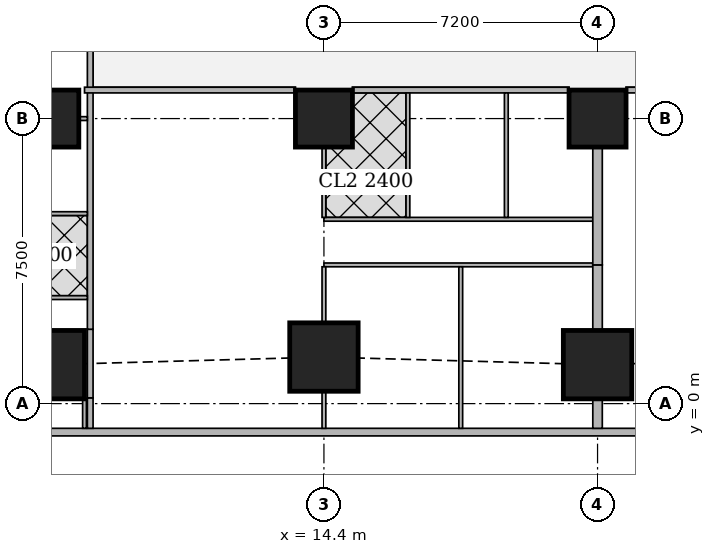
"""IFC4 building model, lengths in metres.
Left out: names, types, materials, properties, quantities, classifications, styles, units other than length and angle.
Written with IfcOpenShell. Run it as: python <this file> out.ifc"""

import sys

from ifc_helpers import new_model, si_unit, direction, frame, frame_2d, origin, origin_2d, place, context, subcontext, project, spatial, rectangle, extrude, element, fill, save


model = new_model("IFC4")
c1 = context("Model", 3, precision=1e-05, world=origin(), true_north=direction((0.0, 1.0)))
c2 = subcontext(c1, "Body", "Model", "MODEL_VIEW")
j1 = project(units=[si_unit("LENGTHUNIT", "METRE"), si_unit("PLANEANGLEUNIT", "RADIAN")], contexts=[c1])
p1 = place(None, origin())
s1 = spatial("IfcSite", under=j1, at=p1, CompositionType="ELEMENT")
p2 = place(p1, origin())
s2 = spatial("IfcBuilding", under=s1, at=p2, CompositionType="ELEMENT")
p3 = place(p2, frame((0.0, 0.0, 169.55)))
s3 = spatial("IfcBuildingStorey", under=s2, at=p3, CompositionType="ELEMENT", Elevation=169.55)
for number, where, z_axis, x_axis in (
    (1, (7.2, 1.025, 0.0), (0.0, 0.0, 1.0), (1.0, 0.0, 0.0)),
    (2, (14.4, 1.225, 0.0), (0.0, 0.0, 1.0), (1.0, 0.0, 0.0)),
    (3, (21.6, 1.025, 0.0), (0.0, 0.0, 1.0), (1.0, 0.0, 0.0)),
):
    element("IfcColumn", number, at=place(p3, frame(where, z_axis=z_axis, x_axis=x_axis)), inside=s3, PredefinedType="COLUMN", context=c2, shape_type="SweptSolid", body=[
        extrude(rectangle(XDim=1.8, YDim=1.8, at=origin_2d()), origin(), (0.0, 0.0, 1.0), 3.75),
    ])
for number, where, z_axis, x_axis in (
    (4, (7.2, 7.5, 0.0), (0.0, 0.0, 1.0), (1.0, 0.0, 0.0)),
    (5, (14.4, 7.5, 0.0), (0.0, 0.0, 1.0), (1.0, 0.0, 0.0)),
    (6, (21.6, 7.5, 0.0), (0.0, 0.0, 1.0), (1.0, 0.0, 0.0)),
):
    element("IfcColumn", number, at=place(p3, frame(where, z_axis=z_axis, x_axis=x_axis)), inside=s3, PredefinedType="COLUMN", context=c2, shape_type="SweptSolid", body=[
        extrude(rectangle(XDim=1.5, YDim=1.5, at=origin_2d()), origin(), (0.0, 0.0, 1.0), 3.75),
    ])
p4 = place(p3, frame((2.163, -0.75, 0.0), z_axis=(0.0, 0.0, 1.0), x_axis=(1.0, 0.0, 0.0)))
e7 = element("IfcWall", 7, at=p4, inside=s3, PredefinedType="SOLIDWALL", context=c2, shape_type="SweptSolid", body=[
    extrude(rectangle(XDim=45.628, YDim=0.2, at=frame_2d((22.814, 0.0))), origin(), (0.0, 0.0, 1.0), 3.5),
])
p5 = place(p4, frame((9.537, 0.0, 0.9)))
e8 = element("IfcOpeningElement", 8, at=p5, cuts=e7, PredefinedType="OPENING", context=c2, shape_type="SweptSolid", body=[
    extrude(rectangle(XDim=1.8, YDim=1.5, at=frame_2d((0.9, 0.75))), frame((0.0, 0.11, 0.0), z_axis=(0.0, -1.0, 0.0), x_axis=(1.0, 0.0, 0.0)), (0.0, 0.0, 1.0), 0.22),
])
p6 = place(p4, frame((13.137, 0.0, 0.9)))
e9 = element("IfcOpeningElement", 9, at=p6, cuts=e7, PredefinedType="OPENING", context=c2, shape_type="SweptSolid", body=[
    extrude(rectangle(XDim=1.8, YDim=1.5, at=frame_2d((0.9, 0.75))), frame((0.0, 0.11, 0.0), z_axis=(0.0, -1.0, 0.0), x_axis=(1.0, 0.0, 0.0)), (0.0, 0.0, 1.0), 0.22),
])
p7 = place(p4, frame((16.737, 0.0, 0.9)))
e10 = element("IfcOpeningElement", 10, at=p7, cuts=e7, PredefinedType="OPENING", context=c2, shape_type="SweptSolid", body=[
    extrude(rectangle(XDim=1.8, YDim=1.5, at=frame_2d((0.9, 0.75))), frame((0.0, 0.11, 0.0), z_axis=(0.0, -1.0, 0.0), x_axis=(1.0, 0.0, 0.0)), (0.0, 0.0, 1.0), 0.22),
])
p8 = place(p4, frame((20.337, 0.0, 0.9)))
e11 = element("IfcOpeningElement", 11, at=p8, cuts=e7, PredefinedType="OPENING", context=c2, shape_type="SweptSolid", body=[
    extrude(rectangle(XDim=1.8, YDim=1.5, at=frame_2d((0.9, 0.75))), frame((0.0, 0.11, 0.0), z_axis=(0.0, -1.0, 0.0), x_axis=(1.0, 0.0, 0.0)), (0.0, 0.0, 1.0), 0.22),
])
p9 = place(p4, frame((23.937, 0.0, 0.9)))
e12 = element("IfcOpeningElement", 12, at=p9, cuts=e7, PredefinedType="OPENING", context=c2, shape_type="SweptSolid", body=[
    extrude(rectangle(XDim=1.8, YDim=1.5, at=frame_2d((0.9, 0.75))), frame((0.0, 0.11, 0.0), z_axis=(0.0, -1.0, 0.0), x_axis=(1.0, 0.0, 0.0)), (0.0, 0.0, 1.0), 0.22),
])
p10 = place(p4, frame((27.537, 0.0, 0.9)))
e13 = element("IfcOpeningElement", 13, at=p10, cuts=e7, PredefinedType="OPENING", context=c2, shape_type="SweptSolid", body=[
    extrude(rectangle(XDim=1.8, YDim=1.5, at=frame_2d((0.9, 0.75))), frame((0.0, 0.11, 0.0), z_axis=(0.0, -1.0, 0.0), x_axis=(1.0, 0.0, 0.0)), (0.0, 0.0, 1.0), 0.22),
])
p11 = place(p4, frame((31.137, 0.0, 0.9)))
e14 = element("IfcOpeningElement", 14, at=p11, cuts=e7, PredefinedType="OPENING", context=c2, shape_type="SweptSolid", body=[
    extrude(rectangle(XDim=1.8, YDim=1.5, at=frame_2d((0.9, 0.75))), frame((0.0, 0.11, 0.0), z_axis=(0.0, -1.0, 0.0), x_axis=(1.0, 0.0, 0.0)), (0.0, 0.0, 1.0), 0.22),
])
p12 = place(p4, frame((34.737, 0.0, 0.9)))
e15 = element("IfcOpeningElement", 15, at=p12, cuts=e7, PredefinedType="OPENING", context=c2, shape_type="SweptSolid", body=[
    extrude(rectangle(XDim=1.8, YDim=1.5, at=frame_2d((0.9, 0.75))), frame((0.0, 0.11, 0.0), z_axis=(0.0, -1.0, 0.0), x_axis=(1.0, 0.0, 0.0)), (0.0, 0.0, 1.0), 0.22),
])
p13 = place(p3, frame((8.25, -0.65, 0.0), z_axis=(0.0, 0.0, 1.0), x_axis=(0.0, 1.0, 0.0)))
e16 = element("IfcWall", 16, at=p13, inside=s3, PredefinedType="SOLIDWALL", context=c2, shape_type="SweptSolid", body=[
    extrude(rectangle(XDim=0.802, YDim=0.15, at=frame_2d((0.401, 0.0))), origin(), (0.0, 0.0, 1.0), 3.5),
])
p14 = place(p3, frame((8.25, 0.152, 0.0), z_axis=(0.0, 0.0, 1.0), x_axis=(0.0, 1.0, 0.0)))
e17 = element("IfcWall", 17, at=p14, inside=s3, PredefinedType="SOLIDWALL", context=c2, shape_type="SweptSolid", body=[
    extrude(rectangle(XDim=1.805, YDim=0.15, at=frame_2d((0.902, 0.0))), origin(), (0.0, 0.0, 1.0), 2.1),
])
p15 = place(p3, frame((8.25, 1.957, 0.0), z_axis=(0.0, 0.0, 1.0), x_axis=(0.0, 1.0, 0.0)))
e18 = element("IfcWall", 18, at=p15, inside=s3, PredefinedType="SOLIDWALL", context=c2, shape_type="SweptSolid", body=[
    extrude(rectangle(XDim=41.111, YDim=0.15, at=frame_2d((20.556, 0.0))), origin(), (0.0, 0.0, 1.0), 3.5),
])
p16 = place(p15, frame((10.642, 0.0, 0.0)))
e19 = element("IfcOpeningElement", 19, at=p16, cuts=e18, PredefinedType="OPENING", context=c2, shape_type="SweptSolid", body=[
    extrude(rectangle(XDim=1.0, YDim=2.1, at=frame_2d((0.5, 1.05))), frame((0.0, 0.085, 0.0), z_axis=(0.0, -1.0, 0.0), x_axis=(1.0, 0.0, 0.0)), (0.0, 0.0, 1.0), 0.17),
])
p17 = place(p15, frame((15.042, 0.0, 0.0)))
e20 = element("IfcOpeningElement", 20, at=p17, cuts=e18, PredefinedType="OPENING", context=c2, shape_type="SweptSolid", body=[
    extrude(rectangle(XDim=1.0, YDim=2.1, at=frame_2d((0.5, 1.05))), frame((0.0, 0.085, 0.0), z_axis=(0.0, -1.0, 0.0), x_axis=(1.0, 0.0, 0.0)), (0.0, 0.0, 1.0), 0.17),
])
p18 = place(p15, frame((22.543, 0.0, 0.0)))
e21 = element("IfcOpeningElement", 21, at=p18, cuts=e18, PredefinedType="OPENING", context=c2, shape_type="SweptSolid", body=[
    extrude(rectangle(XDim=1.0, YDim=2.1, at=frame_2d((0.5, 1.05))), frame((0.0, 0.085, 0.0), z_axis=(0.0, -1.0, 0.0), x_axis=(1.0, 0.0, 0.0)), (0.0, 0.0, 1.0), 0.17),
])
p19 = place(p15, frame((33.142, 0.0, 0.0)))
e22 = element("IfcOpeningElement", 22, at=p19, cuts=e18, PredefinedType="OPENING", context=c2, shape_type="SweptSolid", body=[
    extrude(rectangle(XDim=1.0, YDim=2.1, at=frame_2d((0.5, 1.05))), frame((0.0, 0.085, 0.0), z_axis=(0.0, -1.0, 0.0), x_axis=(1.0, 0.0, 0.0)), (0.0, 0.0, 1.0), 0.17),
])
p20 = place(p3, frame((28.049, 8.25, 0.0), z_axis=(0.0, 0.0, 1.0), x_axis=(-1.0, 0.0, 0.0)))
e23 = element("IfcWall", 23, at=p20, inside=s3, PredefinedType="SOLIDWALL", context=c2, shape_type="SweptSolid", body=[
    extrude(rectangle(XDim=5.698, YDim=0.15, at=frame_2d((2.849, 0.0))), origin(), (0.0, 0.0, 1.0), 3.5),
])
p21 = place(p20, frame((3.549, 0.0, 0.0)))
e24 = element("IfcOpeningElement", 24, at=p21, cuts=e23, PredefinedType="OPENING", context=c2, shape_type="SweptSolid", body=[
    extrude(rectangle(XDim=1.0, YDim=2.1, at=frame_2d((0.5, 1.05))), frame((0.0, 0.085, 0.0), z_axis=(0.0, -1.0, 0.0), x_axis=(1.0, 0.0, 0.0)), (0.0, 0.0, 1.0), 0.17),
])
p22 = place(p3, frame((20.849, 8.25, 0.0), z_axis=(0.0, 0.0, 1.0), x_axis=(-1.0, 0.0, 0.0)))
e25 = element("IfcWall", 25, at=p22, inside=s3, PredefinedType="SOLIDWALL", context=c2, shape_type="SweptSolid", body=[
    extrude(rectangle(XDim=5.698, YDim=0.15, at=frame_2d((2.849, 0.0))), origin(), (0.0, 0.0, 1.0), 3.5),
])
p23 = place(p3, frame((13.649, 8.25, 0.0), z_axis=(0.0, 0.0, 1.0), x_axis=(-1.0, 0.0, 0.0)))
e26 = element("IfcWall", 26, at=p23, inside=s3, PredefinedType="SOLIDWALL", context=c2, shape_type="SweptSolid", body=[
    extrude(rectangle(XDim=5.549, YDim=0.15, at=frame_2d((2.774, 0.0))), origin(), (0.0, 0.0, 1.0), 3.5),
])
p24 = place(p23, frame((1.824, 0.0, 0.0)))
e27 = element("IfcOpeningElement", 27, at=p24, cuts=e26, PredefinedType="OPENING", context=c2, shape_type="SweptSolid", body=[
    extrude(rectangle(XDim=1.0, YDim=2.1, at=frame_2d((0.5, 1.05))), frame((0.0, 0.085, 0.0), z_axis=(0.0, -1.0, 0.0), x_axis=(1.0, 0.0, 0.0)), (0.0, 0.0, 1.0), 0.17),
])
p25 = place(p3, frame((8.1, 0.124, 0.0), z_axis=(0.0, 0.0, 1.0), x_axis=(0.0, -1.0, 0.0)))
e28 = element("IfcWall", 28, at=p25, inside=s3, PredefinedType="PARTITIONING", context=c2, shape_type="SweptSolid", body=[
    extrude(rectangle(XDim=0.774, YDim=0.1, at=frame_2d((0.387, 0.0))), origin(), (0.0, 0.0, 1.0), 3.5),
])
p26 = place(p3, frame((4.9, 4.999, 0.0), z_axis=(0.0, 0.0, 1.0), x_axis=(1.0, 0.0, 0.0)))
e29 = element("IfcWall", 29, at=p26, inside=s3, PredefinedType="PARTITIONING", context=c2, shape_type="SweptSolid", body=[
    extrude(rectangle(XDim=3.275, YDim=0.1, at=frame_2d((1.638, 0.0))), origin(), (0.0, 0.0, 1.0), 3.5),
])
p27 = place(p3, frame((7.951, 7.5, 0.0), z_axis=(0.0, 0.0, 1.0), x_axis=(1.0, 0.0, 0.0)))
e30 = element("IfcWall", 30, at=p27, inside=s3, PredefinedType="PARTITIONING", context=c2, shape_type="SweptSolid", body=[
    extrude(rectangle(XDim=0.224, YDim=0.1, at=frame_2d((0.112, 0.0))), origin(), (0.0, 0.0, 1.0), 3.5),
])
p28 = place(p3, frame((4.9, 2.789, 0.0), z_axis=(0.0, 0.0, 1.0), x_axis=(1.0, 0.0, 0.0)))
e31 = element("IfcWall", 31, at=p28, inside=s3, PredefinedType="PARTITIONING", context=c2, shape_type="SweptSolid", body=[
    extrude(rectangle(XDim=3.275, YDim=0.1, at=frame_2d((1.638, 0.0))), origin(), (0.0, 0.0, 1.0), 3.5),
])
p29 = place(p28, frame((0.45, 0.0, 0.0)))
e32 = element("IfcOpeningElement", 32, at=p29, cuts=e31, PredefinedType="OPENING", context=c2, shape_type="SweptSolid", body=[
    extrude(rectangle(XDim=0.9, YDim=2.1, at=frame_2d((0.45, 1.05))), frame((0.0, 0.06, 0.0), z_axis=(0.0, -1.0, 0.0), x_axis=(1.0, 0.0, 0.0)), (0.0, 0.0, 1.0), 0.12),
])
p30 = place(p3, frame((21.475, 3.65, 0.0), z_axis=(0.0, 0.0, 1.0), x_axis=(-1.0, 0.0, 0.0)))
e33 = element("IfcWall", 33, at=p30, inside=s3, PredefinedType="PARTITIONING", context=c2, shape_type="SweptSolid", body=[
    extrude(rectangle(XDim=7.075, YDim=0.1, at=frame_2d((3.538, 0.0))), origin(), (0.0, 0.0, 1.0), 3.5),
])
p31 = place(p30, frame((5.975, 0.0, 0.0)))
e34 = element("IfcOpeningElement", 34, at=p31, cuts=e33, PredefinedType="OPENING", context=c2, shape_type="SweptSolid", body=[
    extrude(rectangle(XDim=0.9, YDim=2.1, at=frame_2d((0.45, 1.05))), frame((0.0, 0.06, 0.0), z_axis=(0.0, -1.0, 0.0), x_axis=(1.0, 0.0, 0.0)), (0.0, 0.0, 1.0), 0.12),
])
p32 = place(p30, frame((2.375, 0.0, 0.0)))
e35 = element("IfcOpeningElement", 35, at=p32, cuts=e33, PredefinedType="OPENING", context=c2, shape_type="SweptSolid", body=[
    extrude(rectangle(XDim=0.9, YDim=2.1, at=frame_2d((0.45, 1.05))), frame((0.0, 0.06, 0.0), z_axis=(0.0, -1.0, 0.0), x_axis=(1.0, 0.0, 0.0)), (0.0, 0.0, 1.0), 0.12),
])
p33 = place(p3, frame((21.475, 4.85, 0.0), z_axis=(0.0, 0.0, 1.0), x_axis=(-1.0, 0.0, 0.0)))
e36 = element("IfcWall", 36, at=p33, inside=s3, PredefinedType="PARTITIONING", context=c2, shape_type="SweptSolid", body=[
    extrude(rectangle(XDim=7.075, YDim=0.1, at=frame_2d((3.538, 0.0))), origin(), (0.0, 0.0, 1.0), 3.5),
])
p34 = place(p33, frame((5.52, 0.0, 0.0)))
e37 = element("IfcOpeningElement", 37, at=p34, cuts=e36, PredefinedType="OPENING", context=c2, shape_type="SweptSolid", body=[
    extrude(rectangle(XDim=0.9, YDim=2.1, at=frame_2d((0.45, 1.05))), frame((0.0, 0.06, 0.0), z_axis=(0.0, -1.0, 0.0), x_axis=(1.0, 0.0, 0.0)), (0.0, 0.0, 1.0), 0.12),
])
p35 = place(p33, frame((0.625, 0.0, 0.0)))
e38 = element("IfcOpeningElement", 38, at=p35, cuts=e36, PredefinedType="OPENING", context=c2, shape_type="SweptSolid", body=[
    extrude(rectangle(XDim=0.9, YDim=2.1, at=frame_2d((0.45, 1.05))), frame((0.0, 0.06, 0.0), z_axis=(0.0, -1.0, 0.0), x_axis=(1.0, 0.0, 0.0)), (0.0, 0.0, 1.0), 0.12),
])
p36 = place(p33, frame((3.121, 0.0, 0.0)))
e39 = element("IfcOpeningElement", 39, at=p36, cuts=e36, PredefinedType="OPENING", context=c2, shape_type="SweptSolid", body=[
    extrude(rectangle(XDim=0.9, YDim=2.1, at=frame_2d((0.45, 1.05))), frame((0.0, 0.06, 0.0), z_axis=(0.0, -1.0, 0.0), x_axis=(1.0, 0.0, 0.0)), (0.0, 0.0, 1.0), 0.12),
])
p37 = place(p3, frame((14.4, -0.65, 0.0), z_axis=(0.0, 0.0, 1.0), x_axis=(0.0, 1.0, 0.0)))
e40 = element("IfcWall", 40, at=p37, inside=s3, PredefinedType="PARTITIONING", context=c2, shape_type="SweptSolid", body=[
    extrude(rectangle(XDim=0.974, YDim=0.1, at=frame_2d((0.487, 0.0))), origin(), (0.0, 0.0, 1.0), 3.5),
])
p38 = place(p3, frame((14.4, 2.126, 0.0), z_axis=(0.0, 0.0, 1.0), x_axis=(0.0, 1.0, 0.0)))
e41 = element("IfcWall", 41, at=p38, inside=s3, PredefinedType="PARTITIONING", context=c2, shape_type="SweptSolid", body=[
    extrude(rectangle(XDim=1.474, YDim=0.1, at=frame_2d((0.737, 0.0))), origin(), (0.0, 0.0, 1.0), 3.5),
])
p39 = place(p3, frame((18.0, -0.65, 0.0), z_axis=(0.0, 0.0, 1.0), x_axis=(0.0, 1.0, 0.0)))
e42 = element("IfcWall", 42, at=p39, inside=s3, PredefinedType="PARTITIONING", context=c2, shape_type="SweptSolid", body=[
    extrude(rectangle(XDim=4.25, YDim=0.1, at=frame_2d((2.125, 0.0))), origin(), (0.0, 0.0, 1.0), 2.1),
])
p40 = place(p3, frame((14.4, 4.9, 0.0), z_axis=(0.0, 0.0, 1.0), x_axis=(0.0, 1.0, 0.0)))
e43 = element("IfcWall", 43, at=p40, inside=s3, PredefinedType="PARTITIONING", context=c2, shape_type="SweptSolid", body=[
    extrude(rectangle(XDim=1.849, YDim=0.1, at=frame_2d((0.925, 0.0))), origin(), (0.0, 0.0, 1.0), 3.5),
])
for number, where, z_axis, x_axis in (
    (44, (19.199, 4.9, 0.0), (0.0, 0.0, 1.0), (0.0, 1.0, 0.0)),
    (45, (16.61, 4.9, 0.0), (0.0, 0.0, 1.0), (0.0, 1.0, 0.0)),
):
    element("IfcWall", number, at=place(p3, frame(where, z_axis=z_axis, x_axis=x_axis)), inside=s3, PredefinedType="PARTITIONING", context=c2, shape_type="SweptSolid", body=[
        extrude(rectangle(XDim=3.275, YDim=0.1, at=frame_2d((1.638, 0.0))), origin(), (0.0, 0.0, 1.0), 3.5),
    ])
p41 = place(p3, frame((21.6, -0.65, 0.0), z_axis=(0.0, 0.0, 1.0), x_axis=(0.0, 1.0, 0.0)))
e46 = element("IfcWall", 46, at=p41, inside=s3, PredefinedType="SOLIDWALL", context=c2, shape_type="SweptSolid", body=[
    extrude(rectangle(XDim=0.774, YDim=0.25, at=frame_2d((0.387, 0.0))), origin(), (0.0, 0.0, 1.0), 2.1),
])
p42 = place(p3, frame((21.6, 1.926, 0.0), z_axis=(0.0, 0.0, 1.0), x_axis=(0.0, 1.0, 0.0)))
e47 = element("IfcWall", 47, at=p42, inside=s3, PredefinedType="SOLIDWALL", context=c2, shape_type="SweptSolid", body=[
    extrude(rectangle(XDim=1.724, YDim=0.25, at=frame_2d((0.862, 0.0))), origin(), (0.0, 0.0, 1.0), 2.1),
])
p43 = place(p3, frame((21.6, 3.65, 0.0), z_axis=(0.0, 0.0, 1.0), x_axis=(0.0, 1.0, 0.0)))
e48 = element("IfcWall", 48, at=p43, inside=s3, PredefinedType="SOLIDWALL", context=c2, shape_type="SweptSolid", body=[
    extrude(rectangle(XDim=3.099, YDim=0.25, at=frame_2d((1.55, 0.0))), origin(), (0.0, 0.0, 1.0), 3.5),
])
p44 = place(p5, origin())
e49 = element("IfcWindow", 49, at=p44, inside=s3, PartitioningType="SINGLE_PANEL", PredefinedType="WINDOW", context=c2, shape_type="SweptSolid", body=[
    extrude(rectangle(XDim=1.8, YDim=1.5, at=frame_2d((0.9, 0.75))), frame((0.0, 0.03, 0.0), z_axis=(0.0, -1.0, 0.0), x_axis=(1.0, 0.0, 0.0)), (0.0, 0.0, 1.0), 0.06),
])
fill(e8, e49)
p45 = place(p6, origin())
e50 = element("IfcWindow", 50, at=p45, inside=s3, PartitioningType="SINGLE_PANEL", PredefinedType="WINDOW", context=c2, shape_type="SweptSolid", body=[
    extrude(rectangle(XDim=1.8, YDim=1.5, at=frame_2d((0.9, 0.75))), frame((0.0, 0.03, 0.0), z_axis=(0.0, -1.0, 0.0), x_axis=(1.0, 0.0, 0.0)), (0.0, 0.0, 1.0), 0.06),
])
fill(e9, e50)
p46 = place(p7, origin())
e51 = element("IfcWindow", 51, at=p46, inside=s3, PartitioningType="SINGLE_PANEL", PredefinedType="WINDOW", context=c2, shape_type="SweptSolid", body=[
    extrude(rectangle(XDim=1.8, YDim=1.5, at=frame_2d((0.9, 0.75))), frame((0.0, 0.03, 0.0), z_axis=(0.0, -1.0, 0.0), x_axis=(1.0, 0.0, 0.0)), (0.0, 0.0, 1.0), 0.06),
])
fill(e10, e51)
p47 = place(p8, origin())
e52 = element("IfcWindow", 52, at=p47, inside=s3, PartitioningType="SINGLE_PANEL", PredefinedType="WINDOW", context=c2, shape_type="SweptSolid", body=[
    extrude(rectangle(XDim=1.8, YDim=1.5, at=frame_2d((0.9, 0.75))), frame((0.0, 0.03, 0.0), z_axis=(0.0, -1.0, 0.0), x_axis=(1.0, 0.0, 0.0)), (0.0, 0.0, 1.0), 0.06),
])
fill(e11, e52)
p48 = place(p31, origin())
e53 = element("IfcDoor", 53, at=p48, inside=s3, OperationType="SINGLE_SWING_RIGHT", PredefinedType="DOOR", context=c2, shape_type="SweptSolid", body=[
    extrude(rectangle(XDim=0.9, YDim=2.1, at=frame_2d((0.45, 1.05))), frame((0.0, 0.025, 0.0), z_axis=(0.0, -1.0, 0.0), x_axis=(1.0, 0.0, 0.0)), (0.0, 0.0, 1.0), 0.05),
])
fill(e34, e53)
p49 = place(p32, origin())
e54 = element("IfcDoor", 54, at=p49, inside=s3, OperationType="SINGLE_SWING_RIGHT", PredefinedType="DOOR", context=c2, shape_type="SweptSolid", body=[
    extrude(rectangle(XDim=0.9, YDim=2.1, at=frame_2d((0.45, 1.05))), frame((0.0, 0.025, 0.0), z_axis=(0.0, -1.0, 0.0), x_axis=(1.0, 0.0, 0.0)), (0.0, 0.0, 1.0), 0.05),
])
fill(e35, e54)
p50 = place(p34, origin())
e55 = element("IfcDoor", 55, at=p50, inside=s3, OperationType="SINGLE_SWING_LEFT", PredefinedType="DOOR", context=c2, shape_type="SweptSolid", body=[
    extrude(rectangle(XDim=0.9, YDim=2.1, at=frame_2d((0.45, 1.05))), frame((0.0, 0.025, 0.0), z_axis=(0.0, -1.0, 0.0), x_axis=(1.0, 0.0, 0.0)), (0.0, 0.0, 1.0), 0.05),
])
fill(e37, e55)
p51 = place(p35, origin())
e56 = element("IfcDoor", 56, at=p51, inside=s3, OperationType="SINGLE_SWING_RIGHT", PredefinedType="DOOR", context=c2, shape_type="SweptSolid", body=[
    extrude(rectangle(XDim=0.9, YDim=2.1, at=frame_2d((0.45, 1.05))), frame((0.0, 0.025, 0.0), z_axis=(0.0, -1.0, 0.0), x_axis=(1.0, 0.0, 0.0)), (0.0, 0.0, 1.0), 0.05),
])
fill(e38, e56)
p52 = place(p36, origin())
e57 = element("IfcDoor", 57, at=p52, inside=s3, OperationType="SINGLE_SWING_LEFT", PredefinedType="DOOR", context=c2, shape_type="SweptSolid", body=[
    extrude(rectangle(XDim=0.9, YDim=2.1, at=frame_2d((0.45, 1.05))), frame((0.0, 0.025, 0.0), z_axis=(0.0, -1.0, 0.0), x_axis=(1.0, 0.0, 0.0)), (0.0, 0.0, 1.0), 0.05),
])
fill(e39, e57)
p53 = place(p24, origin())
e58 = element("IfcDoor", 58, at=p53, inside=s3, OperationType="SINGLE_SWING_RIGHT", PredefinedType="DOOR", context=c2, shape_type="SweptSolid", body=[
    extrude(rectangle(XDim=1.0, YDim=2.1, at=frame_2d((0.5, 1.05))), frame((0.0, 0.025, 0.0), z_axis=(0.0, -1.0, 0.0), x_axis=(1.0, 0.0, 0.0)), (0.0, 0.0, 1.0), 0.05),
])
fill(e27, e58)
save(model, sys.argv[1])
